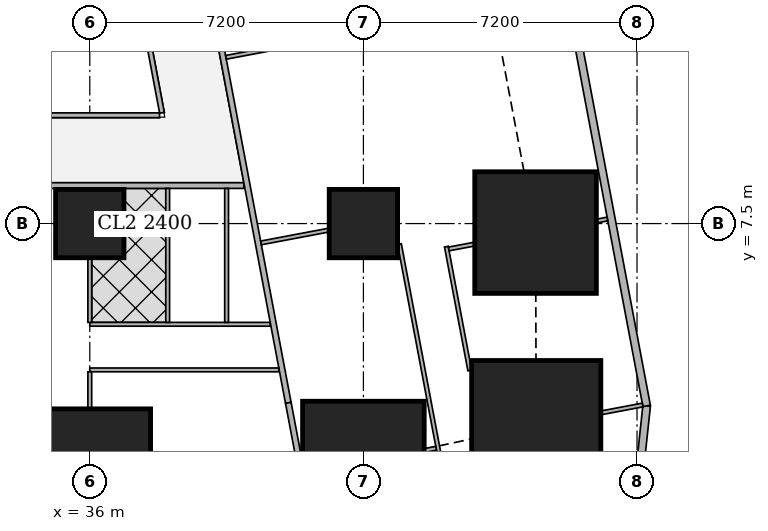
"""IFC4 building model, lengths in metres.
Left out: names, types, materials, properties, quantities, classifications, styles, units other than length and angle.
Written with IfcOpenShell. Run it as: python <this file> out.ifc"""

import sys

from ifc_helpers import new_model, si_unit, direction, frame, frame_2d, origin, origin_2d, place, context, subcontext, project, spatial, rectangle, extrude, element, fill, save


model = new_model("IFC4")
c1 = context("Model", 3, precision=1e-05, world=origin(), true_north=direction((0.0, 1.0)))
c2 = subcontext(c1, "Body", "Model", "MODEL_VIEW")
j1 = project(units=[si_unit("LENGTHUNIT", "METRE"), si_unit("PLANEANGLEUNIT", "RADIAN")], contexts=[c1])
p1 = place(None, origin())
s1 = spatial("IfcSite", under=j1, at=p1, CompositionType="ELEMENT")
p2 = place(p1, origin())
s2 = spatial("IfcBuilding", under=s1, at=p2, CompositionType="ELEMENT")
p3 = place(p2, frame((0.0, 0.0, 20.0)))
s3 = spatial("IfcBuildingStorey", under=s2, at=p3, CompositionType="ELEMENT", Elevation=20.0)
p4 = place(p3, frame((36.0, 1.025, -0.3), z_axis=(0.0, 0.0, 1.0), x_axis=(1.0, 0.0, 0.0)))
e1 = element("IfcColumn", 1, at=p4, inside=s3, PredefinedType="COLUMN", context=c2, shape_type="SweptSolid", body=[
    extrude(rectangle(XDim=3.2, YDim=3.2, at=origin_2d()), origin(), (0.0, 0.0, 1.0), 4.05),
])
p5 = place(p3, frame((43.2, 1.225, 0.0), z_axis=(0.0, 0.0, 1.0), x_axis=(1.0, 0.0, 0.0)))
e2 = element("IfcColumn", 2, at=p5, inside=s3, PredefinedType="COLUMN", context=c2, shape_type="SweptSolid", body=[
    extrude(rectangle(XDim=3.2, YDim=3.2, at=origin_2d()), origin(), (0.0, 0.0, 1.0), 3.75),
])
p6 = place(p3, frame((47.748, 2.197, 0.0), z_axis=(0.0, 0.0, 1.0), x_axis=(1.0, 0.0, 0.0)))
e3 = element("IfcColumn", 3, at=p6, inside=s3, PredefinedType="COLUMN", context=c2, shape_type="SweptSolid", body=[
    extrude(rectangle(XDim=3.4, YDim=3.4, at=origin_2d()), origin(), (0.0, 0.0, 1.0), 3.75),
])
for number, where, z_axis, x_axis in (
    (4, (36.0, 7.5, 0.0), (0.0, 0.0, 1.0), (1.0, 0.0, 0.0)),
    (5, (43.2, 7.5, 0.0), (0.0, 0.0, 1.0), (1.0, 0.0, 0.0)),
):
    element("IfcColumn", number, at=place(p3, frame(where, z_axis=z_axis, x_axis=x_axis)), inside=s3, PredefinedType="COLUMN", context=c2, shape_type="SweptSolid", body=[
        extrude(rectangle(XDim=1.8, YDim=1.8, at=origin_2d()), origin(), (0.0, 0.0, 1.0), 3.75),
    ])
p7 = place(p3, frame((47.73, 7.263, -0.3), z_axis=(0.0, 0.0, 1.0), x_axis=(1.0, 0.0, 0.0)))
e6 = element("IfcColumn", 6, at=p7, inside=s3, PredefinedType="COLUMN", context=c2, shape_type="SweptSolid", body=[
    extrude(rectangle(XDim=3.2, YDim=3.2, at=origin_2d()), origin(), (0.0, 0.0, 1.0), 4.05),
])
p8 = place(p3, frame((50.474, 1.025, 0.0), z_axis=(0.0, 0.0, 1.0), x_axis=(0.106047815515, 0.994361031429, 0.0)))
e7 = element("IfcWall", 7, at=p8, inside=s3, PredefinedType="SOLIDWALL", context=c2, shape_type="SweptSolid", body=[
    extrude(rectangle(XDim=1.688, YDim=0.2, at=frame_2d((0.844, 0.0))), origin(), (0.0, 0.0, 1.0), 3.5),
])
p9 = place(p3, frame((50.653, 2.703, 0.0), z_axis=(0.0, 0.0, 1.0), x_axis=(-0.185612026696, 0.982623109613, 0.0)))
e8 = element("IfcWall", 8, at=p9, inside=s3, PredefinedType="SOLIDWALL", context=c2, shape_type="SweptSolid", body=[
    extrude(rectangle(XDim=41.393, YDim=0.2, at=frame_2d((20.697, 0.0))), origin(), (0.0, 0.0, 1.0), 3.5),
])
p10 = place(p9, frame((1.633, 0.0, 0.9)))
e9 = element("IfcOpeningElement", 9, at=p10, cuts=e8, PredefinedType="OPENING", context=c2, shape_type="SweptSolid", body=[
    extrude(rectangle(XDim=1.8, YDim=1.5, at=frame_2d((0.9, 0.75))), frame((0.0, 0.11, 0.0), z_axis=(0.0, -1.0, 0.0), x_axis=(1.0, 0.0, 0.0)), (0.0, 0.0, 1.0), 0.22),
])
p11 = place(p9, frame((6.032, 0.0, 0.9)))
e10 = element("IfcOpeningElement", 10, at=p11, cuts=e8, PredefinedType="OPENING", context=c2, shape_type="SweptSolid", body=[
    extrude(rectangle(XDim=1.8, YDim=1.5, at=frame_2d((0.9, 0.75))), frame((0.0, 0.11, 0.0), z_axis=(0.0, -1.0, 0.0), x_axis=(1.0, 0.0, 0.0)), (0.0, 0.0, 1.0), 0.22),
])
p12 = place(p9, frame((9.848, 0.0, 0.9)))
e11 = element("IfcOpeningElement", 11, at=p12, cuts=e8, PredefinedType="OPENING", context=c2, shape_type="SweptSolid", body=[
    extrude(rectangle(XDim=1.8, YDim=1.5, at=frame_2d((0.9, 0.75))), frame((0.0, 0.11, 0.0), z_axis=(0.0, -1.0, 0.0), x_axis=(1.0, 0.0, 0.0)), (0.0, 0.0, 1.0), 0.22),
])
p13 = place(p9, frame((17.481, 0.0, 0.9)))
e12 = element("IfcOpeningElement", 12, at=p13, cuts=e8, PredefinedType="OPENING", context=c2, shape_type="SweptSolid", body=[
    extrude(rectangle(XDim=1.8, YDim=1.5, at=frame_2d((0.9, 0.75))), frame((0.0, 0.11, 0.0), z_axis=(0.0, -1.0, 0.0), x_axis=(1.0, 0.0, 0.0)), (0.0, 0.0, 1.0), 0.22),
])
p14 = place(p9, frame((21.297, 0.0, 0.9)))
e13 = element("IfcOpeningElement", 13, at=p14, cuts=e8, PredefinedType="OPENING", context=c2, shape_type="SweptSolid", body=[
    extrude(rectangle(XDim=1.8, YDim=1.5, at=frame_2d((0.9, 0.75))), frame((0.0, 0.11, 0.0), z_axis=(0.0, -1.0, 0.0), x_axis=(1.0, 0.0, 0.0)), (0.0, 0.0, 1.0), 0.22),
])
p15 = place(p9, frame((25.113, 0.0, 0.9)))
e14 = element("IfcOpeningElement", 14, at=p15, cuts=e8, PredefinedType="OPENING", context=c2, shape_type="SweptSolid", body=[
    extrude(rectangle(XDim=1.8, YDim=1.5, at=frame_2d((0.9, 0.75))), frame((0.0, 0.11, 0.0), z_axis=(0.0, -1.0, 0.0), x_axis=(1.0, 0.0, 0.0)), (0.0, 0.0, 1.0), 0.22),
])
p16 = place(p9, frame((28.93, 0.0, 0.9)))
e15 = element("IfcOpeningElement", 15, at=p16, cuts=e8, PredefinedType="OPENING", context=c2, shape_type="SweptSolid", body=[
    extrude(rectangle(XDim=1.8, YDim=1.5, at=frame_2d((0.9, 0.75))), frame((0.0, 0.11, 0.0), z_axis=(0.0, -1.0, 0.0), x_axis=(1.0, 0.0, 0.0)), (0.0, 0.0, 1.0), 0.22),
])
p17 = place(p9, frame((32.746, 0.0, 0.9)))
e16 = element("IfcOpeningElement", 16, at=p17, cuts=e8, PredefinedType="OPENING", context=c2, shape_type="SweptSolid", body=[
    extrude(rectangle(XDim=1.8, YDim=1.5, at=frame_2d((0.9, 0.75))), frame((0.0, 0.11, 0.0), z_axis=(0.0, -1.0, 0.0), x_axis=(1.0, 0.0, 0.0)), (0.0, 0.0, 1.0), 0.22),
])
p18 = place(p9, frame((36.481, 0.0, 0.9)))
e17 = element("IfcOpeningElement", 17, at=p18, cuts=e8, PredefinedType="OPENING", context=c2, shape_type="SweptSolid", body=[
    extrude(rectangle(XDim=1.8, YDim=1.5, at=frame_2d((0.9, 0.75))), frame((0.0, 0.11, 0.0), z_axis=(0.0, -1.0, 0.0), x_axis=(1.0, 0.0, 0.0)), (0.0, 0.0, 1.0), 0.22),
])
p19 = place(p3, frame((40.054, 8.5, 0.0), z_axis=(0.0, 0.0, 1.0), x_axis=(-1.0, 0.0, 0.0)))
e18 = element("IfcWall", 18, at=p19, inside=s3, PredefinedType="SOLIDWALL", context=c2, shape_type="SweptSolid", body=[
    extrude(rectangle(XDim=31.704, YDim=0.15, at=frame_2d((15.852, 0.0))), origin(), (0.0, 0.0, 1.0), 3.5),
])
p20 = place(p19, frame((27.321, 0.0, 0.0)))
e19 = element("IfcOpeningElement", 19, at=p20, cuts=e18, PredefinedType="OPENING", context=c2, shape_type="SweptSolid", body=[
    extrude(rectangle(XDim=1.0, YDim=2.1, at=frame_2d((0.5, 1.05))), frame((0.0, 0.085, 0.0), z_axis=(0.0, -1.0, 0.0), x_axis=(1.0, 0.0, 0.0)), (0.0, 0.0, 1.0), 0.17),
])
p21 = place(p19, frame((23.054, 0.0, 0.0)))
e20 = element("IfcOpeningElement", 20, at=p21, cuts=e18, PredefinedType="OPENING", context=c2, shape_type="SweptSolid", body=[
    extrude(rectangle(XDim=1.0, YDim=2.1, at=frame_2d((0.5, 1.05))), frame((0.0, 0.085, 0.0), z_axis=(0.0, -1.0, 0.0), x_axis=(1.0, 0.0, 0.0)), (0.0, 0.0, 1.0), 0.17),
])
p22 = place(p19, frame((15.754, 0.0, 0.0)))
e21 = element("IfcOpeningElement", 21, at=p22, cuts=e18, PredefinedType="OPENING", context=c2, shape_type="SweptSolid", body=[
    extrude(rectangle(XDim=1.0, YDim=2.1, at=frame_2d((0.5, 1.05))), frame((0.0, 0.085, 0.0), z_axis=(0.0, -1.0, 0.0), x_axis=(1.0, 0.0, 0.0)), (0.0, 0.0, 1.0), 0.17),
])
p23 = place(p19, frame((5.754, 0.0, 0.0)))
e22 = element("IfcOpeningElement", 22, at=p23, cuts=e18, PredefinedType="OPENING", context=c2, shape_type="SweptSolid", body=[
    extrude(rectangle(XDim=1.0, YDim=2.1, at=frame_2d((0.5, 1.05))), frame((0.0, 0.085, 0.0), z_axis=(0.0, -1.0, 0.0), x_axis=(1.0, 0.0, 0.0)), (0.0, 0.0, 1.0), 0.17),
])
p24 = place(p3, frame((33.755, 42.325, 0.0), z_axis=(0.0, 0.0, 1.0), x_axis=(0.185611461091, -0.982623216453, 0.0)))
e23 = element("IfcWall", 23, at=p24, inside=s3, PredefinedType="SOLIDWALL", context=c2, shape_type="SweptSolid", body=[
    extrude(rectangle(XDim=40.241, YDim=0.15, at=frame_2d((20.121, 0.0))), origin(), (0.0, 0.0, 1.0), 2.5),
])
p25 = place(p24, frame((7.325, 0.0, 0.0)))
e24 = element("IfcOpeningElement", 24, at=p25, cuts=e23, PredefinedType="OPENING", context=c2, shape_type="SweptSolid", body=[
    extrude(rectangle(XDim=1.0, YDim=2.1, at=frame_2d((0.5, 1.05))), frame((0.0, 0.085, 0.0), z_axis=(0.0, -1.0, 0.0), x_axis=(1.0, 0.0, 0.0)), (0.0, 0.0, 1.0), 0.17),
])
p26 = place(p24, frame((11.902, 0.0, 0.0)))
e25 = element("IfcOpeningElement", 25, at=p26, cuts=e23, PredefinedType="OPENING", context=c2, shape_type="SweptSolid", body=[
    extrude(rectangle(XDim=1.0, YDim=2.1, at=frame_2d((0.5, 1.05))), frame((0.0, 0.085, 0.0), z_axis=(0.0, -1.0, 0.0), x_axis=(1.0, 0.0, 0.0)), (0.0, 0.0, 1.0), 0.17),
])
p27 = place(p24, frame((25.718, 0.0, 0.0)))
e26 = element("IfcOpeningElement", 26, at=p27, cuts=e23, PredefinedType="OPENING", context=c2, shape_type="SweptSolid", body=[
    extrude(rectangle(XDim=1.0, YDim=2.1, at=frame_2d((0.5, 1.05))), frame((0.0, 0.085, 0.0), z_axis=(0.0, -1.0, 0.0), x_axis=(1.0, 0.0, 0.0)), (0.0, 0.0, 1.0), 0.17),
])
p28 = place(p24, frame((31.788, 0.0, 0.0)))
e27 = element("IfcOpeningElement", 27, at=p28, cuts=e23, PredefinedType="OPENING", context=c2, shape_type="SweptSolid", body=[
    extrude(rectangle(XDim=1.0, YDim=2.1, at=frame_2d((0.5, 1.05))), frame((0.0, 0.085, 0.0), z_axis=(0.0, -1.0, 0.0), x_axis=(1.0, 0.0, 0.0)), (0.0, 0.0, 1.0), 0.17),
])
p29 = place(p3, frame((41.224, 2.783, 0.0), z_axis=(0.0, 0.0, 1.0), x_axis=(0.185566507215, -0.982631706897, 0.0)))
e28 = element("IfcWall", 28, at=p29, inside=s3, PredefinedType="SOLIDWALL", context=c2, shape_type="SweptSolid", body=[
    extrude(rectangle(XDim=1.626, YDim=0.15, at=frame_2d((0.813, 0.0))), origin(), (0.0, 0.0, 1.0), 2.05),
])
p30 = place(p3, frame((40.975, 3.65, 0.0), z_axis=(0.0, 0.0, 1.0), x_axis=(-1.0, 0.0, 0.0)))
e29 = element("IfcWall", 29, at=p30, inside=s3, PredefinedType="PARTITIONING", context=c2, shape_type="SweptSolid", body=[
    extrude(rectangle(XDim=4.975, YDim=0.1, at=frame_2d((2.488, 0.0))), origin(), (0.0, 0.0, 1.0), 3.5),
])
p31 = place(p30, frame((2.45, 0.0, 0.0)))
e30 = element("IfcOpeningElement", 30, at=p31, cuts=e29, PredefinedType="OPENING", context=c2, shape_type="SweptSolid", body=[
    extrude(rectangle(XDim=0.9, YDim=2.1, at=frame_2d((0.45, 1.05))), frame((0.0, 0.06, 0.0), z_axis=(0.0, -1.0, 0.0), x_axis=(1.0, 0.0, 0.0)), (0.0, 0.0, 1.0), 0.12),
])
p32 = place(p3, frame((40.748, 4.85, 0.0), z_axis=(0.0, 0.0, 1.0), x_axis=(-1.0, 0.0, 0.0)))
e31 = element("IfcWall", 31, at=p32, inside=s3, PredefinedType="PARTITIONING", context=c2, shape_type="SweptSolid", body=[
    extrude(rectangle(XDim=4.748, YDim=0.1, at=frame_2d((2.374, 0.0))), origin(), (0.0, 0.0, 1.0), 3.5),
])
p33 = place(p32, frame((3.273, 0.0, 0.0)))
e32 = element("IfcOpeningElement", 32, at=p33, cuts=e31, PredefinedType="OPENING", context=c2, shape_type="SweptSolid", body=[
    extrude(rectangle(XDim=0.9, YDim=2.1, at=frame_2d((0.45, 1.05))), frame((0.0, 0.06, 0.0), z_axis=(0.0, -1.0, 0.0), x_axis=(1.0, 0.0, 0.0)), (0.0, 0.0, 1.0), 0.12),
])
p34 = place(p32, frame((0.15, 0.0, 0.0)))
e33 = element("IfcOpeningElement", 33, at=p34, cuts=e31, PredefinedType="OPENING", context=c2, shape_type="SweptSolid", body=[
    extrude(rectangle(XDim=0.9, YDim=2.1, at=frame_2d((0.45, 1.05))), frame((0.0, 0.06, 0.0), z_axis=(0.0, -1.0, 0.0), x_axis=(1.0, 0.0, 0.0)), (0.0, 0.0, 1.0), 0.12),
])
p35 = place(p32, frame((1.473, 0.0, 0.0)))
e34 = element("IfcOpeningElement", 34, at=p35, cuts=e31, PredefinedType="OPENING", context=c2, shape_type="SweptSolid", body=[
    extrude(rectangle(XDim=0.9, YDim=2.1, at=frame_2d((0.45, 1.05))), frame((0.0, 0.06, 0.0), z_axis=(0.0, -1.0, 0.0), x_axis=(1.0, 0.0, 0.0)), (0.0, 0.0, 1.0), 0.12),
])
p36 = place(p3, frame((36.0, 2.626, 0.0), z_axis=(0.0, 0.0, 1.0), x_axis=(0.0, 1.0, 0.0)))
e35 = element("IfcWall", 35, at=p36, inside=s3, PredefinedType="PARTITIONING", context=c2, shape_type="SweptSolid", body=[
    extrude(rectangle(XDim=0.974, YDim=0.1, at=frame_2d((0.487, 0.0))), origin(), (0.0, 0.0, 1.0), 3.5),
])
p37 = place(p3, frame((36.0, 4.9, 0.0), z_axis=(0.0, 0.0, 1.0), x_axis=(0.0, 1.0, 0.0)))
e36 = element("IfcWall", 36, at=p37, inside=s3, PredefinedType="PARTITIONING", context=c2, shape_type="SweptSolid", body=[
    extrude(rectangle(XDim=1.699, YDim=0.1, at=frame_2d((0.85, 0.0))), origin(), (0.0, 0.0, 1.0), 3.5),
])
for number, where, z_axis, x_axis in (
    (37, (39.6, 4.9, 0.0), (0.0, 0.0, 1.0), (0.0, 1.0, 0.0)),
    (38, (38.05, 4.9, 0.0), (0.0, 0.0, 1.0), (0.0, 1.0, 0.0)),
):
    element("IfcWall", number, at=place(p3, frame(where, z_axis=z_axis, x_axis=x_axis)), inside=s3, PredefinedType="PARTITIONING", context=c2, shape_type="SweptSolid", body=[
        extrude(rectangle(XDim=3.525, YDim=0.1, at=frame_2d((1.763, 0.0))), origin(), (0.0, 0.0, 1.0), 3.5),
    ])
p38 = place(p3, frame((43.145, 12.547, 0.0), z_axis=(0.0, 0.0, 1.0), x_axis=(-0.982610451136, -0.185679027675, 0.0)))
e39 = element("IfcWall", 39, at=p38, inside=s3, PredefinedType="PARTITIONING", context=c2, shape_type="SweptSolid", body=[
    extrude(rectangle(XDim=3.625, YDim=0.1, at=frame_2d((1.812, 0.0))), origin(), (0.0, 0.0, 1.0), 3.5),
])
p39 = place(p38, frame((2.55, 0.0, 0.0)))
e40 = element("IfcOpeningElement", 40, at=p39, cuts=e39, PredefinedType="OPENING", context=c2, shape_type="SweptSolid", body=[
    extrude(rectangle(XDim=0.9, YDim=2.1, at=frame_2d((0.45, 1.05))), frame((0.0, 0.06, 0.0), z_axis=(0.0, -1.0, 0.0), x_axis=(1.0, 0.0, 0.0)), (0.0, 0.0, 1.0), 0.12),
])
p40 = place(p3, frame((45.383, 6.894, 0.0), z_axis=(0.0, 0.0, 1.0), x_axis=(0.185714962489, -0.982603660032, 0.0)))
e41 = element("IfcWall", 41, at=p40, inside=s3, PredefinedType="PARTITIONING", context=c2, shape_type="SweptSolid", body=[
    extrude(rectangle(XDim=3.317, YDim=0.1, at=frame_2d((1.658, 0.0))), origin(), (0.0, 0.0, 1.0), 3.5),
])
p41 = place(p40, frame((1.5, 0.0, 0.0)))
e42 = element("IfcOpeningElement", 42, at=p41, cuts=e41, PredefinedType="OPENING", context=c2, shape_type="SweptSolid", body=[
    extrude(rectangle(XDim=0.9, YDim=2.1, at=frame_2d((0.45, 1.05))), frame((0.0, 0.06, 0.0), z_axis=(0.0, -1.0, 0.0), x_axis=(1.0, 0.0, 0.0)), (0.0, 0.0, 1.0), 0.12),
])
p42 = place(p3, frame((44.149, 6.96, 0.0), z_axis=(0.0, 0.0, 1.0), x_axis=(0.185677796828, -0.982610683722, 0.0)))
e43 = element("IfcWall", 43, at=p42, inside=s3, PredefinedType="PARTITIONING", context=c2, shape_type="SweptSolid", body=[
    extrude(rectangle(XDim=7.745, YDim=0.1, at=frame_2d((3.872, 0.0))), origin(), (0.0, 0.0, 1.0), 2.1),
])
p43 = place(p3, frame((49.622, 7.62, 0.0), z_axis=(0.0, 0.0, 1.0), x_axis=(-0.982649953213, -0.185469861299, 0.0)))
e44 = element("IfcWall", 44, at=p43, inside=s3, PredefinedType="PARTITIONING", context=c2, shape_type="SweptSolid", body=[
    extrude(rectangle(XDim=0.287, YDim=0.1, at=frame_2d((0.144, 0.0))), origin(), (0.0, 0.0, 1.0), 3.5),
])
p44 = place(p3, frame((46.12, 6.959, 0.0), z_axis=(0.0, 0.0, 1.0), x_axis=(-0.982722777639, -0.185083608972, 0.0)))
e45 = element("IfcWall", 45, at=p44, inside=s3, PredefinedType="PARTITIONING", context=c2, shape_type="SweptSolid", body=[
    extrude(rectangle(XDim=0.686, YDim=0.1, at=frame_2d((0.343, 0.0))), origin(), (0.0, 0.0, 1.0), 3.5),
])
p45 = place(p3, frame((50.547, 2.726, 0.0), z_axis=(0.0, 0.0, 1.0), x_axis=(-0.982569158372, -0.185897415303, 0.0)))
e46 = element("IfcWall", 46, at=p45, inside=s3, PredefinedType="PARTITIONING", context=c2, shape_type="SweptSolid", body=[
    extrude(rectangle(XDim=1.108, YDim=0.1, at=frame_2d((0.554, 0.0))), origin(), (0.0, 0.0, 1.0), 3.5),
])
p46 = place(p3, frame((42.29, 7.328, 0.0), z_axis=(0.0, 0.0, 1.0), x_axis=(-0.98262927905, -0.185579362952, 0.0)))
e47 = element("IfcWall", 47, at=p46, inside=s3, PredefinedType="PARTITIONING", context=c2, shape_type="SweptSolid", body=[
    extrude(rectangle(XDim=1.815, YDim=0.1, at=frame_2d((0.908, 0.0))), origin(), (0.0, 0.0, 1.0), 3.5),
])
p47 = place(p3, frame((45.114, 1.587, 0.0), z_axis=(0.0, 0.0, 1.0), x_axis=(-0.982934694903, -0.183954846516, 0.0)))
e48 = element("IfcWall", 48, at=p47, inside=s3, PredefinedType="PARTITIONING", context=c2, shape_type="SweptSolid", body=[
    extrude(rectangle(XDim=0.309, YDim=0.1, at=frame_2d((0.155, 0.0))), origin(), (0.0, 0.0, 1.0), 2.1),
])
p48 = place(p3, frame((28.95, 10.35, 0.0), z_axis=(0.0, 0.0, 1.0), x_axis=(1.0, 0.0, 0.0)))
e49 = element("IfcWall", 49, at=p48, inside=s3, PredefinedType="PARTITIONING", context=c2, shape_type="SweptSolid", body=[
    extrude(rectangle(XDim=8.886, YDim=0.125, at=frame_2d((4.443, 0.0))), origin(), (0.0, 0.0, 1.0), 3.5),
])
p49 = place(p3, frame((37.9, 10.413, 0.0), z_axis=(0.0, 0.0, 1.0), x_axis=(-0.185527510388, 0.982639070508, 0.0)))
e50 = element("IfcWall", 50, at=p49, inside=s3, PredefinedType="PARTITIONING", context=c2, shape_type="SweptSolid", body=[
    extrude(rectangle(XDim=5.056, YDim=0.125, at=frame_2d((2.528, 0.0))), origin(), (0.0, 0.0, 1.0), 3.5),
])
p50 = place(p49, frame((0.708, 0.0, 0.0)))
e51 = element("IfcOpeningElement", 51, at=p50, cuts=e50, PredefinedType="OPENING", context=c2, shape_type="SweptSolid", body=[
    extrude(rectangle(XDim=1.0, YDim=2.1, at=frame_2d((0.5, 1.05))), frame((0.0, 0.073, 0.0), z_axis=(0.0, -1.0, 0.0), x_axis=(1.0, 0.0, 0.0)), (0.0, 0.0, 1.0), 0.145),
])
p51 = place(p10, origin())
e52 = element("IfcWindow", 52, at=p51, inside=s3, PartitioningType="SINGLE_PANEL", PredefinedType="WINDOW", context=c2, shape_type="SweptSolid", body=[
    extrude(rectangle(XDim=1.8, YDim=1.5, at=frame_2d((0.9, 0.75))), frame((0.0, 0.03, 0.0), z_axis=(0.0, -1.0, 0.0), x_axis=(1.0, 0.0, 0.0)), (0.0, 0.0, 1.0), 0.06),
])
fill(e9, e52)
p52 = place(p11, origin())
e53 = element("IfcWindow", 53, at=p52, inside=s3, PartitioningType="SINGLE_PANEL", PredefinedType="WINDOW", context=c2, shape_type="SweptSolid", body=[
    extrude(rectangle(XDim=1.8, YDim=1.5, at=frame_2d((0.9, 0.75))), frame((0.0, 0.03, 0.0), z_axis=(0.0, -1.0, 0.0), x_axis=(1.0, 0.0, 0.0)), (0.0, 0.0, 1.0), 0.06),
])
fill(e10, e53)
p53 = place(p31, origin())
e54 = element("IfcDoor", 54, at=p53, inside=s3, OperationType="SINGLE_SWING_RIGHT", PredefinedType="DOOR", context=c2, shape_type="SweptSolid", body=[
    extrude(rectangle(XDim=0.9, YDim=2.1, at=frame_2d((0.45, 1.05))), frame((0.0, 0.025, 0.0), z_axis=(0.0, -1.0, 0.0), x_axis=(1.0, 0.0, 0.0)), (0.0, 0.0, 1.0), 0.05),
])
fill(e30, e54)
p54 = place(p33, origin())
e55 = element("IfcDoor", 55, at=p54, inside=s3, OperationType="SINGLE_SWING_LEFT", PredefinedType="DOOR", context=c2, shape_type="SweptSolid", body=[
    extrude(rectangle(XDim=0.9, YDim=2.1, at=frame_2d((0.45, 1.05))), frame((0.0, 0.025, 0.0), z_axis=(0.0, -1.0, 0.0), x_axis=(1.0, 0.0, 0.0)), (0.0, 0.0, 1.0), 0.05),
])
fill(e32, e55)
p55 = place(p34, origin())
e56 = element("IfcDoor", 56, at=p55, inside=s3, OperationType="SINGLE_SWING_RIGHT", PredefinedType="DOOR", context=c2, shape_type="SweptSolid", body=[
    extrude(rectangle(XDim=0.9, YDim=2.1, at=frame_2d((0.45, 1.05))), frame((0.0, 0.025, 0.0), z_axis=(0.0, -1.0, 0.0), x_axis=(1.0, 0.0, 0.0)), (0.0, 0.0, 1.0), 0.05),
])
fill(e33, e56)
p56 = place(p35, origin())
e57 = element("IfcDoor", 57, at=p56, inside=s3, OperationType="SINGLE_SWING_RIGHT", PredefinedType="DOOR", context=c2, shape_type="SweptSolid", body=[
    extrude(rectangle(XDim=0.9, YDim=2.1, at=frame_2d((0.45, 1.05))), frame((0.0, 0.025, 0.0), z_axis=(0.0, -1.0, 0.0), x_axis=(1.0, 0.0, 0.0)), (0.0, 0.0, 1.0), 0.05),
])
fill(e34, e57)
p57 = place(p39, origin())
e58 = element("IfcDoor", 58, at=p57, inside=s3, OperationType="SINGLE_SWING_LEFT", PredefinedType="DOOR", context=c2, shape_type="SweptSolid", body=[
    extrude(rectangle(XDim=0.9, YDim=2.1, at=frame_2d((0.45, 1.05))), frame((0.0, 0.025, 0.0), z_axis=(0.0, -1.0, 0.0), x_axis=(1.0, 0.0, 0.0)), (0.0, 0.0, 1.0), 0.05),
])
fill(e40, e58)
p58 = place(p41, origin())
e59 = element("IfcDoor", 59, at=p58, inside=s3, OperationType="SINGLE_SWING_RIGHT", PredefinedType="DOOR", context=c2, shape_type="SweptSolid", body=[
    extrude(rectangle(XDim=0.9, YDim=2.1, at=frame_2d((0.45, 1.05))), frame((0.0, 0.025, 0.0), z_axis=(0.0, -1.0, 0.0), x_axis=(1.0, 0.0, 0.0)), (0.0, 0.0, 1.0), 0.05),
])
fill(e42, e59)
p59 = place(p28, origin())
e60 = element("IfcDoor", 60, at=p59, inside=s3, OperationType="SINGLE_SWING_RIGHT", PredefinedType="DOOR", context=c2, shape_type="SweptSolid", body=[
    extrude(rectangle(XDim=1.0, YDim=2.1, at=frame_2d((0.5, 1.05))), frame((0.0, 0.025, 0.0), z_axis=(0.0, -1.0, 0.0), x_axis=(1.0, 0.0, 0.0)), (0.0, 0.0, 1.0), 0.05),
])
fill(e27, e60)
p60 = place(p50, origin())
e61 = element("IfcDoor", 61, at=p60, inside=s3, OperationType="SINGLE_SWING_LEFT", PredefinedType="DOOR", context=c2, shape_type="SweptSolid", body=[
    extrude(rectangle(XDim=1.0, YDim=2.1, at=frame_2d((0.5, 1.05))), frame((0.0, 0.025, 0.0), z_axis=(0.0, -1.0, 0.0), x_axis=(1.0, 0.0, 0.0)), (0.0, 0.0, 1.0), 0.05),
])
fill(e51, e61)
save(model, sys.argv[1])
